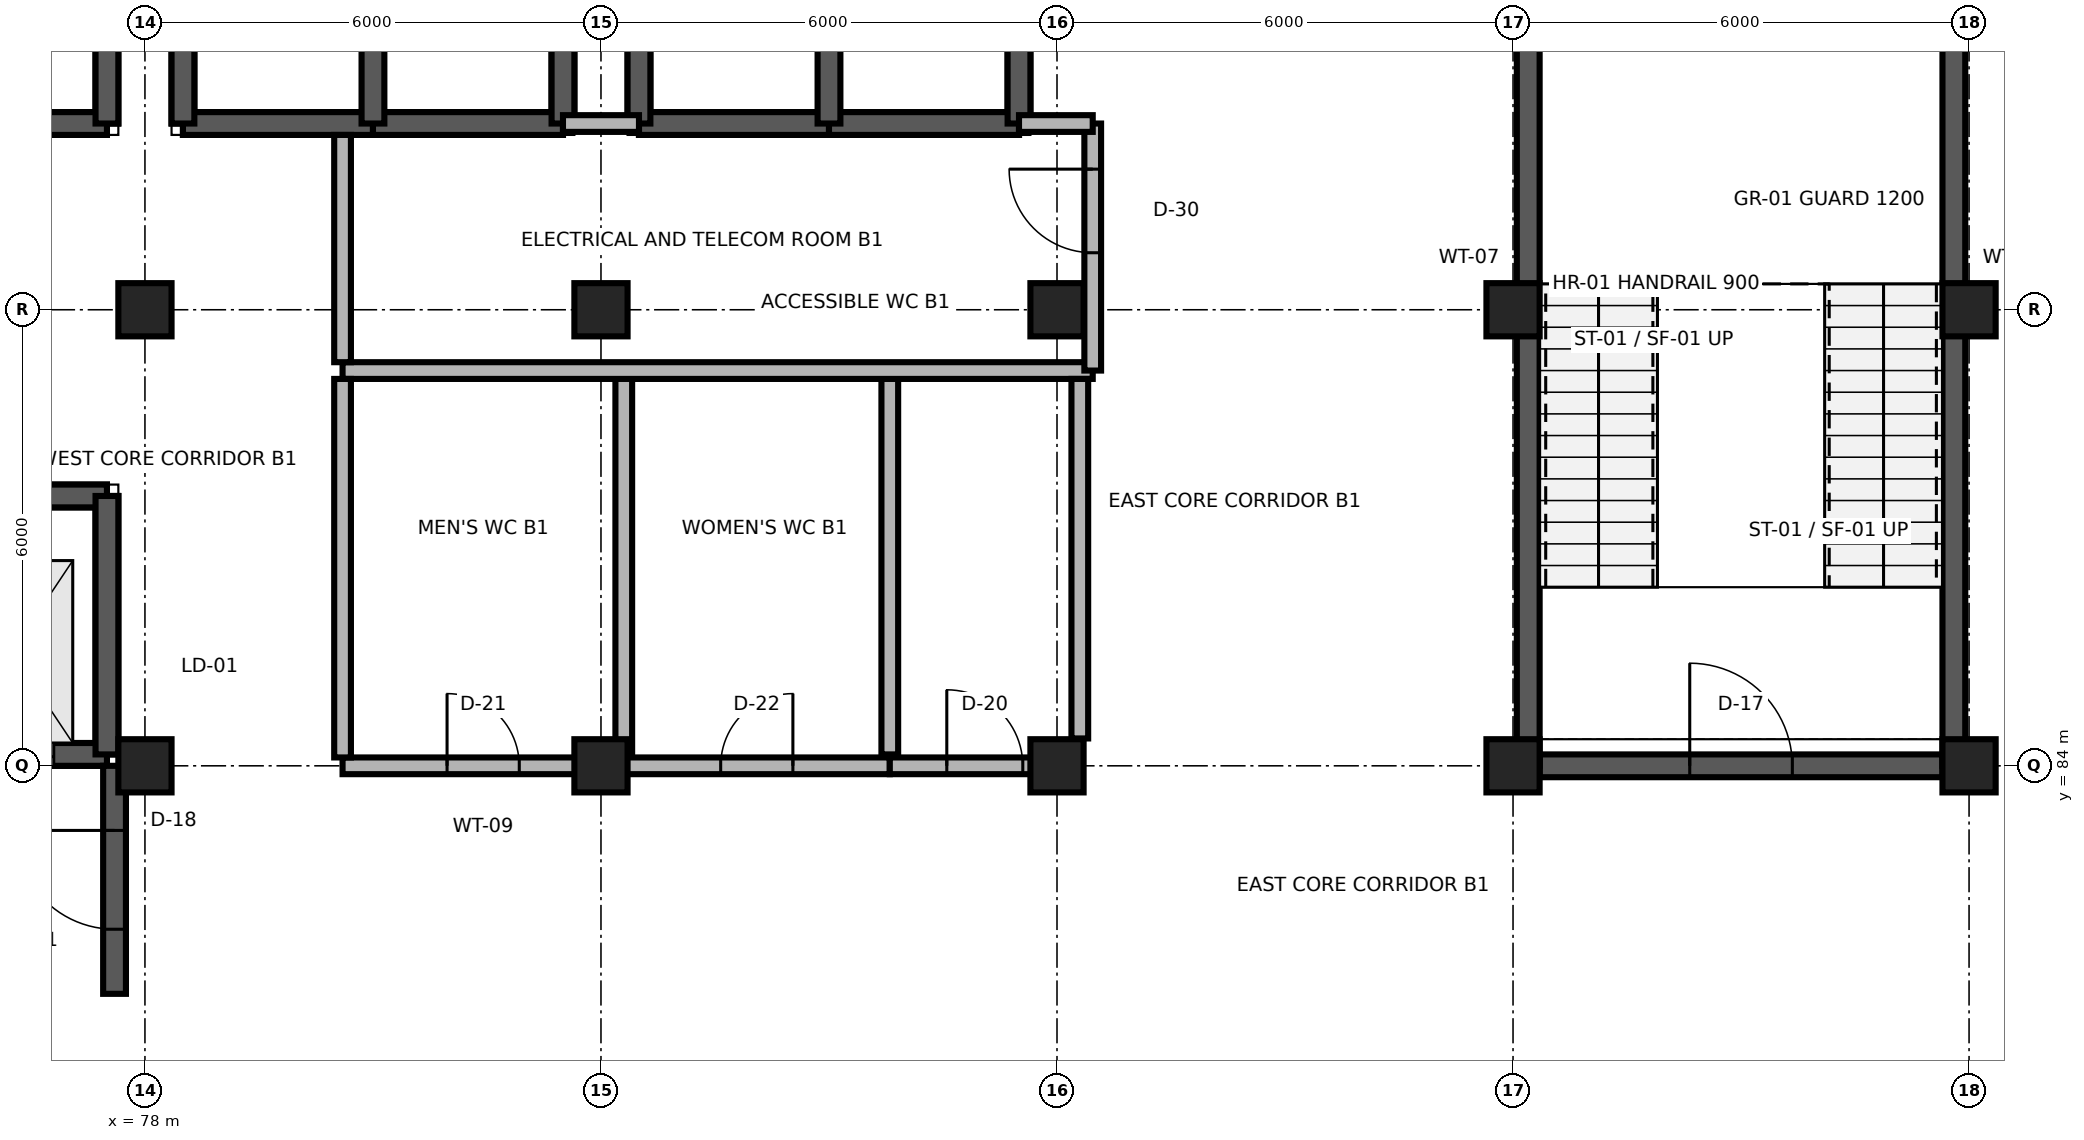
"""IFC4 building model, lengths in metres.
Left out: names, types, materials, properties, quantities, classifications, styles, units other than length and angle.
Written with IfcOpenShell. Run it as: python <this file> out.ifc"""

import sys

from ifc_helpers import new_model, si_unit, direction, frame, frame_2d, origin, origin_2d, place, context, subcontext, project, spatial, rectangle, extrude, element, fill, save


model = new_model("IFC4")
c1 = context("Model", 3, precision=1e-05, world=origin(), true_north=direction((0.0, 1.0)))
c2 = subcontext(c1, "Body", "Model", "MODEL_VIEW")
j1 = project(units=[si_unit("LENGTHUNIT", "METRE"), si_unit("PLANEANGLEUNIT", "RADIAN")], contexts=[c1])
p1 = place(None, origin())
s1 = spatial("IfcSite", under=j1, at=p1, CompositionType="ELEMENT")
p2 = place(p1, origin())
s2 = spatial("IfcBuilding", under=s1, at=p2, CompositionType="ELEMENT")
p3 = place(p2, frame((0.0, 0.0, -4.8)))
s3 = spatial("IfcBuildingStorey", under=s2, at=p3, CompositionType="ELEMENT", Elevation=-4.8)
for number, where, z_axis, x_axis in (
    (1, (78.0, 84.0, 0.0), (0.0, 0.0, 1.0), (1.0, 0.0, 0.0)),
    (2, (84.0, 84.0, 0.0), (0.0, 0.0, 1.0), (1.0, 0.0, 0.0)),
    (3, (90.0, 84.0, 0.0), (0.0, 0.0, 1.0), (1.0, 0.0, 0.0)),
    (4, (96.0, 84.0, 0.0), (0.0, 0.0, 1.0), (1.0, 0.0, 0.0)),
    (5, (102.0, 84.0, 0.0), (0.0, 0.0, 1.0), (1.0, 0.0, 0.0)),
    (6, (78.0, 90.0, 0.0), (0.0, 0.0, 1.0), (1.0, 0.0, 0.0)),
    (7, (84.0, 90.0, 0.0), (0.0, 0.0, 1.0), (1.0, 0.0, 0.0)),
    (8, (90.0, 90.0, 0.0), (0.0, 0.0, 1.0), (1.0, 0.0, 0.0)),
    (9, (96.0, 90.0, 0.0), (0.0, 0.0, 1.0), (1.0, 0.0, 0.0)),
    (10, (102.0, 90.0, 0.0), (0.0, 0.0, 1.0), (1.0, 0.0, 0.0)),
):
    element("IfcColumn", number, at=place(p3, frame(where, z_axis=z_axis, x_axis=x_axis)), inside=s3, PredefinedType="COLUMN", context=c2, shape_type="SweptSolid", body=[
        extrude(rectangle(XDim=0.7, YDim=0.7, at=origin_2d()), origin(), (0.0, 0.0, 1.0), 4.8),
    ])
p4 = place(p3, frame((96.35, 84.0, 0.0), z_axis=(0.0, 0.0, 1.0), x_axis=(1.0, 0.0, 0.0)))
e11 = element("IfcWall", 11, at=p4, inside=s3, PredefinedType="SHEAR", context=c2, shape_type="SweptSolid", body=[
    extrude(rectangle(XDim=5.3, YDim=0.3, at=frame_2d((2.65, 0.0))), origin(), (0.0, 0.0, 1.0), 4.48),
])
p5 = place(p4, frame((1.975, 0.0, 0.0)))
e12 = element("IfcOpeningElement", 12, at=p5, cuts=e11, PredefinedType="OPENING", context=c2, shape_type="SweptSolid", body=[
    extrude(rectangle(XDim=1.35, YDim=2.2, at=frame_2d((0.675, 1.1))), frame((0.0, 0.165, 0.0), z_axis=(0.0, -1.0, 0.0), x_axis=(1.0, 0.0, 0.0)), (0.0, 0.0, 1.0), 0.33),
])
for number, where, z_axis, x_axis in (
    (13, (96.2, 84.0, 0.0), (0.0, 0.0, 1.0), (0.0, 1.0, 0.0)),
    (14, (101.8, 84.0, 0.0), (0.0, 0.0, 1.0), (0.0, 1.0, 0.0)),
):
    element("IfcWall", number, at=place(p3, frame(where, z_axis=z_axis, x_axis=x_axis)), inside=s3, PredefinedType="SHEAR", context=c2, shape_type="SweptSolid", body=[
        extrude(rectangle(XDim=11.8, YDim=0.3, at=frame_2d((5.9, 0.0))), origin(), (0.0, 0.0, 1.0), 4.48),
    ])
for number, where, z_axis, x_axis in (
    (15, (72.5, 84.15, -1.6), (0.0, 0.0, 1.0), (1.0, 0.0, 0.0)),
    (16, (72.5, 87.55, -1.6), (0.0, 0.0, 1.0), (1.0, 0.0, 0.0)),
):
    element("IfcWall", number, at=place(p3, frame(where, z_axis=z_axis, x_axis=x_axis)), inside=s3, PredefinedType="SHEAR", context=c2, shape_type="SweptSolid", body=[
        extrude(rectangle(XDim=5.0, YDim=0.3, at=frame_2d((2.5, 0.0))), origin(), (0.0, 0.0, 1.0), 1.6),
    ])
p6 = place(p3, frame((77.5, 84.15, -1.6), z_axis=(0.0, 0.0, 1.0), x_axis=(0.0, 1.0, 0.0)))
e17 = element("IfcWall", 17, at=p6, inside=s3, PredefinedType="SHEAR", context=c2, shape_type="SweptSolid", body=[
    extrude(rectangle(XDim=3.4, YDim=0.3, at=frame_2d((1.7, 0.0))), origin(), (0.0, 0.0, 1.0), 1.6),
])
p7 = place(p3, frame((72.5, 92.45, -1.6), z_axis=(0.0, 0.0, 1.0), x_axis=(1.0, 0.0, 0.0)))
e18 = element("IfcWall", 18, at=p7, inside=s3, PredefinedType="SHEAR", context=c2, shape_type="SweptSolid", body=[
    extrude(rectangle(XDim=5.0, YDim=0.3, at=frame_2d((2.5, 0.0))), origin(), (0.0, 0.0, 1.0), 1.6),
])
p8 = place(p3, frame((77.5, 92.45, -1.6), z_axis=(0.0, 0.0, 1.0), x_axis=(0.0, 1.0, 0.0)))
e19 = element("IfcWall", 19, at=p8, inside=s3, PredefinedType="SHEAR", context=c2, shape_type="SweptSolid", body=[
    extrude(rectangle(XDim=3.4, YDim=0.3, at=frame_2d((1.7, 0.0))), origin(), (0.0, 0.0, 1.0), 1.6),
])
p9 = place(p3, frame((78.5, 92.45, -1.6), z_axis=(0.0, 0.0, 1.0), x_axis=(1.0, 0.0, 0.0)))
e20 = element("IfcWall", 20, at=p9, inside=s3, PredefinedType="SHEAR", context=c2, shape_type="SweptSolid", body=[
    extrude(rectangle(XDim=5.0, YDim=0.3, at=frame_2d((2.5, 0.0))), origin(), (0.0, 0.0, 1.0), 1.6),
])
for number, where, z_axis, x_axis in (
    (21, (78.5, 92.45, -1.6), (0.0, 0.0, 1.0), (0.0, 1.0, 0.0)),
    (22, (83.5, 92.45, -1.6), (0.0, 0.0, 1.0), (0.0, 1.0, 0.0)),
):
    element("IfcWall", number, at=place(p3, frame(where, z_axis=z_axis, x_axis=x_axis)), inside=s3, PredefinedType="SHEAR", context=c2, shape_type="SweptSolid", body=[
        extrude(rectangle(XDim=3.4, YDim=0.3, at=frame_2d((1.7, 0.0))), origin(), (0.0, 0.0, 1.0), 1.6),
    ])
p10 = place(p3, frame((84.5, 92.45, -1.6), z_axis=(0.0, 0.0, 1.0), x_axis=(1.0, 0.0, 0.0)))
e23 = element("IfcWall", 23, at=p10, inside=s3, PredefinedType="SHEAR", context=c2, shape_type="SweptSolid", body=[
    extrude(rectangle(XDim=5.0, YDim=0.3, at=frame_2d((2.5, 0.0))), origin(), (0.0, 0.0, 1.0), 1.6),
])
for number, where, z_axis, x_axis in (
    (24, (84.5, 92.45, -1.6), (0.0, 0.0, 1.0), (0.0, 1.0, 0.0)),
    (25, (89.5, 92.45, -1.6), (0.0, 0.0, 1.0), (0.0, 1.0, 0.0)),
):
    element("IfcWall", number, at=place(p3, frame(where, z_axis=z_axis, x_axis=x_axis)), inside=s3, PredefinedType="SHEAR", context=c2, shape_type="SweptSolid", body=[
        extrude(rectangle(XDim=3.4, YDim=0.3, at=frame_2d((1.7, 0.0))), origin(), (0.0, 0.0, 1.0), 1.6),
    ])
p11 = place(p3, frame((75.0, 84.15, 0.0), z_axis=(0.0, 0.0, 1.0), x_axis=(1.0, 0.0, 0.0)))
e26 = element("IfcWall", 26, at=p11, inside=s3, PredefinedType="SHEAR", context=c2, shape_type="SweptSolid", body=[
    extrude(rectangle(XDim=2.5, YDim=0.3, at=frame_2d((1.25, 0.0))), origin(), (0.0, 0.0, 1.0), 4.48),
])
p12 = place(p11, frame((0.7, 0.0, 0.0)))
e27 = element("IfcOpeningElement", 27, at=p12, cuts=e26, PredefinedType="OPENING", context=c2, shape_type="SweptSolid", body=[
    extrude(rectangle(XDim=1.1, YDim=2.1, at=frame_2d((0.55, 1.05))), frame((0.0, 0.165, 0.0), z_axis=(0.0, -1.0, 0.0), x_axis=(1.0, 0.0, 0.0)), (0.0, 0.0, 1.0), 0.33),
])
p13 = place(p3, frame((75.0, 87.55, 0.0), z_axis=(0.0, 0.0, 1.0), x_axis=(1.0, 0.0, 0.0)))
e28 = element("IfcWall", 28, at=p13, inside=s3, PredefinedType="SHEAR", context=c2, shape_type="SweptSolid", body=[
    extrude(rectangle(XDim=2.5, YDim=0.3, at=frame_2d((1.25, 0.0))), origin(), (0.0, 0.0, 1.0), 4.48),
])
p14 = place(p3, frame((77.5, 84.15, 0.0), z_axis=(0.0, 0.0, 1.0), x_axis=(0.0, 1.0, 0.0)))
e29 = element("IfcWall", 29, at=p14, inside=s3, PredefinedType="SHEAR", context=c2, shape_type="SweptSolid", body=[
    extrude(rectangle(XDim=3.4, YDim=0.3, at=frame_2d((1.7, 0.0))), origin(), (0.0, 0.0, 1.0), 4.48),
])
p15 = place(p3, frame((75.0, 92.45, 0.0), z_axis=(0.0, 0.0, 1.0), x_axis=(1.0, 0.0, 0.0)))
e30 = element("IfcWall", 30, at=p15, inside=s3, PredefinedType="SHEAR", context=c2, shape_type="SweptSolid", body=[
    extrude(rectangle(XDim=2.5, YDim=0.3, at=frame_2d((1.25, 0.0))), origin(), (0.0, 0.0, 1.0), 4.48),
])
p16 = place(p3, frame((77.5, 92.45, 0.0), z_axis=(0.0, 0.0, 1.0), x_axis=(0.0, 1.0, 0.0)))
e31 = element("IfcWall", 31, at=p16, inside=s3, PredefinedType="SHEAR", context=c2, shape_type="SweptSolid", body=[
    extrude(rectangle(XDim=3.4, YDim=0.3, at=frame_2d((1.7, 0.0))), origin(), (0.0, 0.0, 1.0), 4.48),
])
p17 = place(p3, frame((78.5, 92.45, 0.0), z_axis=(0.0, 0.0, 1.0), x_axis=(1.0, 0.0, 0.0)))
e32 = element("IfcWall", 32, at=p17, inside=s3, PredefinedType="SHEAR", context=c2, shape_type="SweptSolid", body=[
    extrude(rectangle(XDim=2.5, YDim=0.3, at=frame_2d((1.25, 0.0))), origin(), (0.0, 0.0, 1.0), 4.48),
])
p18 = place(p3, frame((78.5, 92.45, 0.0), z_axis=(0.0, 0.0, 1.0), x_axis=(0.0, 1.0, 0.0)))
e33 = element("IfcWall", 33, at=p18, inside=s3, PredefinedType="SHEAR", context=c2, shape_type="SweptSolid", body=[
    extrude(rectangle(XDim=3.4, YDim=0.3, at=frame_2d((1.7, 0.0))), origin(), (0.0, 0.0, 1.0), 4.48),
])
p19 = place(p3, frame((81.0, 92.45, 0.0), z_axis=(0.0, 0.0, 1.0), x_axis=(1.0, 0.0, 0.0)))
e34 = element("IfcWall", 34, at=p19, inside=s3, PredefinedType="SHEAR", context=c2, shape_type="SweptSolid", body=[
    extrude(rectangle(XDim=2.5, YDim=0.3, at=frame_2d((1.25, 0.0))), origin(), (0.0, 0.0, 1.0), 4.48),
])
for number, where, z_axis, x_axis in (
    (35, (81.0, 92.45, 0.0), (0.0, 0.0, 1.0), (0.0, 1.0, 0.0)),
    (36, (83.5, 92.45, 0.0), (0.0, 0.0, 1.0), (0.0, 1.0, 0.0)),
):
    element("IfcWall", number, at=place(p3, frame(where, z_axis=z_axis, x_axis=x_axis)), inside=s3, PredefinedType="SHEAR", context=c2, shape_type="SweptSolid", body=[
        extrude(rectangle(XDim=3.4, YDim=0.3, at=frame_2d((1.7, 0.0))), origin(), (0.0, 0.0, 1.0), 4.48),
    ])
p20 = place(p3, frame((84.5, 92.45, 0.0), z_axis=(0.0, 0.0, 1.0), x_axis=(1.0, 0.0, 0.0)))
e37 = element("IfcWall", 37, at=p20, inside=s3, PredefinedType="SHEAR", context=c2, shape_type="SweptSolid", body=[
    extrude(rectangle(XDim=2.5, YDim=0.3, at=frame_2d((1.25, 0.0))), origin(), (0.0, 0.0, 1.0), 4.48),
])
p21 = place(p3, frame((84.5, 92.45, 0.0), z_axis=(0.0, 0.0, 1.0), x_axis=(0.0, 1.0, 0.0)))
e38 = element("IfcWall", 38, at=p21, inside=s3, PredefinedType="SHEAR", context=c2, shape_type="SweptSolid", body=[
    extrude(rectangle(XDim=3.4, YDim=0.3, at=frame_2d((1.7, 0.0))), origin(), (0.0, 0.0, 1.0), 4.48),
])
p22 = place(p3, frame((87.0, 92.45, 0.0), z_axis=(0.0, 0.0, 1.0), x_axis=(1.0, 0.0, 0.0)))
e39 = element("IfcWall", 39, at=p22, inside=s3, PredefinedType="SHEAR", context=c2, shape_type="SweptSolid", body=[
    extrude(rectangle(XDim=2.5, YDim=0.3, at=frame_2d((1.25, 0.0))), origin(), (0.0, 0.0, 1.0), 4.48),
])
for number, where, z_axis, x_axis in (
    (40, (87.0, 92.45, 0.0), (0.0, 0.0, 1.0), (0.0, 1.0, 0.0)),
    (41, (89.5, 92.45, 0.0), (0.0, 0.0, 1.0), (0.0, 1.0, 0.0)),
):
    element("IfcWall", number, at=place(p3, frame(where, z_axis=z_axis, x_axis=x_axis)), inside=s3, PredefinedType="SHEAR", context=c2, shape_type="SweptSolid", body=[
        extrude(rectangle(XDim=3.4, YDim=0.3, at=frame_2d((1.7, 0.0))), origin(), (0.0, 0.0, 1.0), 4.48),
    ])
p23 = place(p3, frame((77.6, 81.0, 0.0), z_axis=(0.0, 0.0, 1.0), x_axis=(0.0, 1.0, 0.0)))
e42 = element("IfcWall", 42, at=p23, inside=s3, PredefinedType="SHEAR", context=c2, shape_type="SweptSolid", body=[
    extrude(rectangle(XDim=3.0, YDim=0.3, at=frame_2d((1.5, 0.0))), origin(), (0.0, 0.0, 1.0), 4.48),
])
p24 = place(p23, frame((0.85, 0.0, 0.0)))
e43 = element("IfcOpeningElement", 43, at=p24, cuts=e42, PredefinedType="OPENING", context=c2, shape_type="SweptSolid", body=[
    extrude(rectangle(XDim=1.3, YDim=2.2, at=frame_2d((0.65, 1.1))), frame((0.0, 0.165, 0.0), z_axis=(0.0, -1.0, 0.0), x_axis=(1.0, 0.0, 0.0)), (0.0, 0.0, 1.0), 0.33),
])
p25 = place(p3, frame((80.6, 84.0, 0.0), z_axis=(0.0, 0.0, 1.0), x_axis=(1.0, 0.0, 0.0)))
e44 = element("IfcWall", 44, at=p25, inside=s3, PredefinedType="PARTITIONING", context=c2, shape_type="SweptSolid", body=[
    extrude(rectangle(XDim=3.7, YDim=0.22, at=frame_2d((1.85, 0.0))), origin(), (0.0, 0.0, 1.0), 4.04),
])
p26 = place(p25, frame((1.375, 0.0, 0.0)))
e45 = element("IfcOpeningElement", 45, at=p26, cuts=e44, PredefinedType="OPENING", context=c2, shape_type="SweptSolid", body=[
    extrude(rectangle(XDim=0.95, YDim=2.15, at=frame_2d((0.475, 1.075))), frame((0.0, 0.125, 0.0), z_axis=(0.0, -1.0, 0.0), x_axis=(1.0, 0.0, 0.0)), (0.0, 0.0, 1.0), 0.25),
])
p27 = place(p3, frame((84.3, 84.0, 0.0), z_axis=(0.0, 0.0, 1.0), x_axis=(1.0, 0.0, 0.0)))
e46 = element("IfcWall", 46, at=p27, inside=s3, PredefinedType="PARTITIONING", context=c2, shape_type="SweptSolid", body=[
    extrude(rectangle(XDim=3.5, YDim=0.22, at=frame_2d((1.75, 0.0))), origin(), (0.0, 0.0, 1.0), 4.04),
])
p28 = place(p27, frame((1.275, 0.0, 0.0)))
e47 = element("IfcOpeningElement", 47, at=p28, cuts=e46, PredefinedType="OPENING", context=c2, shape_type="SweptSolid", body=[
    extrude(rectangle(XDim=0.95, YDim=2.1, at=frame_2d((0.475, 1.05))), frame((0.0, 0.125, 0.0), z_axis=(0.0, -1.0, 0.0), x_axis=(1.0, 0.0, 0.0)), (0.0, 0.0, 1.0), 0.25),
])
p29 = place(p3, frame((87.8, 84.0, 0.0), z_axis=(0.0, 0.0, 1.0), x_axis=(1.0, 0.0, 0.0)))
e48 = element("IfcWall", 48, at=p29, inside=s3, PredefinedType="PARTITIONING", context=c2, shape_type="SweptSolid", body=[
    extrude(rectangle(XDim=2.5, YDim=0.22, at=frame_2d((1.25, 0.0))), origin(), (0.0, 0.0, 1.0), 4.04),
])
p30 = place(p29, frame((0.75, 0.0, 0.0)))
e49 = element("IfcOpeningElement", 49, at=p30, cuts=e48, PredefinedType="OPENING", context=c2, shape_type="SweptSolid", body=[
    extrude(rectangle(XDim=1.0, YDim=2.15, at=frame_2d((0.5, 1.075))), frame((0.0, 0.125, 0.0), z_axis=(0.0, -1.0, 0.0), x_axis=(1.0, 0.0, 0.0)), (0.0, 0.0, 1.0), 0.25),
])
for number, where, z_axis, x_axis in (
    (50, (84.3, 84.15, 0.0), (0.0, 0.0, 1.0), (0.0, 1.0, 0.0)),
    (51, (87.8, 84.15, 0.0), (0.0, 0.0, 1.0), (0.0, 1.0, 0.0)),
):
    element("IfcWall", number, at=place(p3, frame(where, z_axis=z_axis, x_axis=x_axis)), inside=s3, PredefinedType="PARTITIONING", context=c2, shape_type="SweptSolid", body=[
        extrude(rectangle(XDim=5.0, YDim=0.22, at=frame_2d((2.5, 0.0))), origin(), (0.0, 0.0, 1.0), 4.48),
    ])
p31 = place(p3, frame((80.6, 89.2, 0.0), z_axis=(0.0, 0.0, 1.0), x_axis=(1.0, 0.0, 0.0)))
e52 = element("IfcWall", 52, at=p31, inside=s3, PredefinedType="PARTITIONING", context=c2, shape_type="SweptSolid", body=[
    extrude(rectangle(XDim=9.87, YDim=0.22, at=frame_2d((4.935, 0.0))), origin(), (0.0, 0.0, 1.0), 4.48),
])
p32 = place(p3, frame((90.47, 89.2, 0.0), z_axis=(0.0, 0.0, 1.0), x_axis=(0.0, 1.0, 0.0)))
e53 = element("IfcWall", 53, at=p32, inside=s3, PredefinedType="PARTITIONING", context=c2, shape_type="SweptSolid", body=[
    extrude(rectangle(XDim=3.25, YDim=0.22, at=frame_2d((1.625, 0.0))), origin(), (0.0, 0.0, 1.0), 4.48),
])
p33 = place(p32, frame((1.55, 0.0, 0.0)))
e54 = element("IfcOpeningElement", 54, at=p33, cuts=e53, PredefinedType="OPENING", context=c2, shape_type="SweptSolid", body=[
    extrude(rectangle(XDim=1.1, YDim=2.15, at=frame_2d((0.55, 1.075))), frame((0.0, 0.125, 0.0), z_axis=(0.0, -1.0, 0.0), x_axis=(1.0, 0.0, 0.0)), (0.0, 0.0, 1.0), 0.25),
])
p34 = place(p3, frame((80.6, 84.11, 0.0), z_axis=(0.0, 0.0, 1.0), x_axis=(0.0, 1.0, 0.0)))
e55 = element("IfcWall", 55, at=p34, inside=s3, PredefinedType="PARTITIONING", context=c2, shape_type="SweptSolid", body=[
    extrude(rectangle(XDim=4.98, YDim=0.22, at=frame_2d((2.49, 0.0))), origin(), (0.0, 0.0, 1.0), 4.48),
])
p35 = place(p3, frame((90.3, 84.36, 0.0), z_axis=(0.0, 0.0, 1.0), x_axis=(0.0, 1.0, 0.0)))
e56 = element("IfcWall", 56, at=p35, inside=s3, PredefinedType="PARTITIONING", context=c2, shape_type="SweptSolid", body=[
    extrude(rectangle(XDim=4.73, YDim=0.22, at=frame_2d((2.365, 0.0))), origin(), (0.0, 0.0, 1.0), 4.48),
])
p36 = place(p3, frame((80.6, 89.31, 0.0), z_axis=(0.0, 0.0, 1.0), x_axis=(0.0, 1.0, 0.0)))
e57 = element("IfcWall", 57, at=p36, inside=s3, PredefinedType="PARTITIONING", context=c2, shape_type="SweptSolid", body=[
    extrude(rectangle(XDim=2.99, YDim=0.22, at=frame_2d((1.495, 0.0))), origin(), (0.0, 0.0, 1.0), 4.48),
])
p37 = place(p3, frame((83.5, 92.45, 0.0), z_axis=(0.0, 0.0, 1.0), x_axis=(1.0, 0.0, 0.0)))
e58 = element("IfcWall", 58, at=p37, inside=s3, PredefinedType="PARTITIONING", context=c2, shape_type="SweptSolid", body=[
    extrude(rectangle(XDim=1.0, YDim=0.22, at=frame_2d((0.5, 0.0))), origin(), (0.0, 0.0, 1.0), 4.48),
])
p38 = place(p3, frame((89.5, 92.45, 0.0), z_axis=(0.0, 0.0, 1.0), x_axis=(1.0, 0.0, 0.0)))
e59 = element("IfcWall", 59, at=p38, inside=s3, PredefinedType="PARTITIONING", context=c2, shape_type="SweptSolid", body=[
    extrude(rectangle(XDim=0.97, YDim=0.22, at=frame_2d((0.485, 0.0))), origin(), (0.0, 0.0, 1.0), 4.48),
])
p39 = place(p5, origin())
e60 = element("IfcDoor", 60, at=p39, inside=s3, OperationType="SINGLE_SWING_LEFT", PredefinedType="DOOR", context=c2, shape_type="SweptSolid", body=[
    extrude(rectangle(XDim=1.35, YDim=2.2, at=frame_2d((0.675, 1.1))), frame((0.0, 0.025, 0.0), z_axis=(0.0, -1.0, 0.0), x_axis=(1.0, 0.0, 0.0)), (0.0, 0.0, 1.0), 0.05),
])
fill(e12, e60)
p40 = place(p12, origin())
e61 = element("IfcDoor", 61, at=p40, inside=s3, OperationType="DOUBLE_DOOR_SLIDING", PredefinedType="DOOR", context=c2, shape_type="SweptSolid", body=[
    extrude(rectangle(XDim=1.1, YDim=2.1, at=frame_2d((0.55, 1.05))), frame((0.0, 0.025, 0.0), z_axis=(0.0, -1.0, 0.0), x_axis=(1.0, 0.0, 0.0)), (0.0, 0.0, 1.0), 0.05),
])
fill(e27, e61)
p41 = place(p24, origin())
e62 = element("IfcDoor", 62, at=p41, inside=s3, OperationType="SINGLE_SWING_RIGHT", PredefinedType="DOOR", context=c2, shape_type="SweptSolid", body=[
    extrude(rectangle(XDim=1.3, YDim=2.2, at=frame_2d((0.65, 1.1))), frame((0.0, 0.025, 0.0), z_axis=(0.0, -1.0, 0.0), x_axis=(1.0, 0.0, 0.0)), (0.0, 0.0, 1.0), 0.05),
])
fill(e43, e62)
p42 = place(p26, origin())
e63 = element("IfcDoor", 63, at=p42, inside=s3, OperationType="SINGLE_SWING_LEFT", PredefinedType="DOOR", context=c2, shape_type="SweptSolid", body=[
    extrude(rectangle(XDim=0.95, YDim=2.15, at=frame_2d((0.475, 1.075))), frame((0.0, 0.025, 0.0), z_axis=(0.0, -1.0, 0.0), x_axis=(1.0, 0.0, 0.0)), (0.0, 0.0, 1.0), 0.05),
])
fill(e45, e63)
p43 = place(p28, origin())
e64 = element("IfcDoor", 64, at=p43, inside=s3, OperationType="SINGLE_SWING_RIGHT", PredefinedType="DOOR", context=c2, shape_type="SweptSolid", body=[
    extrude(rectangle(XDim=0.95, YDim=2.1, at=frame_2d((0.475, 1.05))), frame((0.0, 0.025, 0.0), z_axis=(0.0, -1.0, 0.0), x_axis=(1.0, 0.0, 0.0)), (0.0, 0.0, 1.0), 0.05),
])
fill(e47, e64)
p44 = place(p30, origin())
e65 = element("IfcDoor", 65, at=p44, inside=s3, OperationType="SINGLE_SWING_LEFT", PredefinedType="DOOR", context=c2, shape_type="SweptSolid", body=[
    extrude(rectangle(XDim=1.0, YDim=2.15, at=frame_2d((0.5, 1.075))), frame((0.0, 0.025, 0.0), z_axis=(0.0, -1.0, 0.0), x_axis=(1.0, 0.0, 0.0)), (0.0, 0.0, 1.0), 0.05),
])
fill(e49, e65)
p45 = place(p33, origin())
e66 = element("IfcDoor", 66, at=p45, inside=s3, OperationType="SINGLE_SWING_RIGHT", PredefinedType="DOOR", context=c2, shape_type="SweptSolid", body=[
    extrude(rectangle(XDim=1.1, YDim=2.15, at=frame_2d((0.55, 1.075))), frame((0.0, 0.025, 0.0), z_axis=(0.0, -1.0, 0.0), x_axis=(1.0, 0.0, 0.0)), (0.0, 0.0, 1.0), 0.05),
])
fill(e54, e66)
save(model, sys.argv[1])
